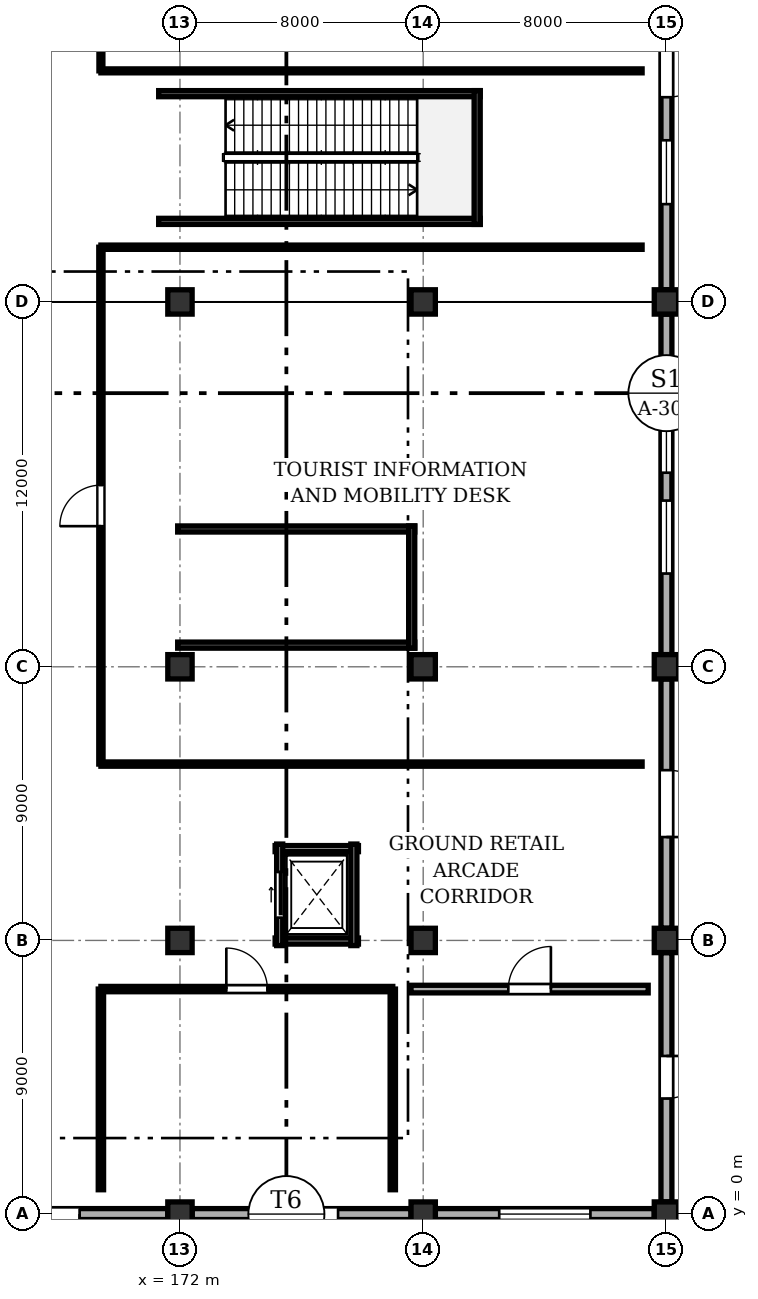
"""IFC4 building model, lengths in metres.
Left out: names, types, materials, properties, quantities, classifications, styles, units other than length and angle.
Written with IfcOpenShell. Run it as: python <this file> out.ifc"""

import sys

from ifc_helpers import new_model, si_unit, direction, frame, frame_2d, origin, origin_2d, place, context, subcontext, project, spatial, rectangle, extrude, element, fill, save


model = new_model("IFC4")
c1 = context("Model", 3, precision=1e-05, world=origin(), true_north=direction((0.0, 1.0)))
c2 = subcontext(c1, "Body", "Model", "MODEL_VIEW")
j1 = project(units=[si_unit("LENGTHUNIT", "METRE"), si_unit("PLANEANGLEUNIT", "RADIAN")], contexts=[c1])
p1 = place(None, origin())
s1 = spatial("IfcSite", under=j1, at=p1, CompositionType="ELEMENT")
p2 = place(p1, origin())
s2 = spatial("IfcBuilding", under=s1, at=p2, CompositionType="ELEMENT")
p3 = place(p2, origin())
s3 = spatial("IfcBuildingStorey", under=s2, at=p3, CompositionType="ELEMENT", Elevation=0.0)
for number, where, z_axis, x_axis in (
    (1, (172.0, 0.0, 0.0), (0.0, 0.0, 1.0), (1.0, 0.0, 0.0)),
    (2, (172.0, 9.0, 0.0), (0.0, 0.0, 1.0), (1.0, 0.0, 0.0)),
    (3, (172.0, 18.0, 0.0), (0.0, 0.0, 1.0), (1.0, 0.0, 0.0)),
    (4, (172.0, 30.0, 0.0), (0.0, 0.0, 1.0), (1.0, 0.0, 0.0)),
    (5, (180.0, 0.0, 0.0), (0.0, 0.0, 1.0), (1.0, 0.0, 0.0)),
    (6, (180.0, 9.0, 0.0), (0.0, 0.0, 1.0), (1.0, 0.0, 0.0)),
    (7, (180.0, 18.0, 0.0), (0.0, 0.0, 1.0), (1.0, 0.0, 0.0)),
    (8, (180.0, 30.0, 0.0), (0.0, 0.0, 1.0), (1.0, 0.0, 0.0)),
    (9, (188.0, 0.0, 0.0), (0.0, 0.0, 1.0), (1.0, 0.0, 0.0)),
    (10, (188.0, 9.0, 0.0), (0.0, 0.0, 1.0), (1.0, 0.0, 0.0)),
    (11, (188.0, 18.0, 0.0), (0.0, 0.0, 1.0), (1.0, 0.0, 0.0)),
    (12, (188.0, 30.0, 0.0), (0.0, 0.0, 1.0), (1.0, 0.0, 0.0)),
):
    element("IfcColumn", number, at=place(p3, frame(where, z_axis=z_axis, x_axis=x_axis)), inside=s3, PredefinedType="COLUMN", context=c2, shape_type="SweptSolid", body=[
        extrude(rectangle(XDim=0.8, YDim=0.8, at=origin_2d()), origin(), (0.0, 0.0, 1.0), 6.6),
    ])
p4 = place(p3, frame((171.6, 0.0, 0.0), z_axis=(0.0, 0.0, 1.0), x_axis=(-1.0, 0.0, 0.0)))
e13 = element("IfcWall", 13, at=p4, inside=s3, PredefinedType="SOLIDWALL", context=c2, shape_type="SweptSolid", body=[
    extrude(rectangle(XDim=8.2, YDim=0.36, at=frame_2d((4.1, 0.0))), origin(), (0.0, 0.0, 1.0), 5.875),
])
p5 = place(p4, frame((2.9, 0.0, 0.0)))
e14 = element("IfcOpeningElement", 14, at=p5, cuts=e13, PredefinedType="OPENING", context=c2, shape_type="SweptSolid", body=[
    extrude(rectangle(XDim=2.4, YDim=2.5, at=frame_2d((1.2, 1.25))), frame((0.0, 0.19, 0.0), z_axis=(0.0, -1.0, 0.0), x_axis=(1.0, 0.0, 0.0)), (0.0, 0.0, 1.0), 0.38),
])
p6 = place(p3, frame((179.6, 0.0, 0.0), z_axis=(0.0, 0.0, 1.0), x_axis=(-1.0, 0.0, 0.0)))
e15 = element("IfcWall", 15, at=p6, inside=s3, PredefinedType="SOLIDWALL", context=c2, shape_type="SweptSolid", body=[
    extrude(rectangle(XDim=7.2, YDim=0.36, at=frame_2d((3.6, 0.0))), origin(), (0.0, 0.0, 1.0), 5.875),
])
p7 = place(p6, frame((2.4, 0.0, 0.0)))
e16 = element("IfcOpeningElement", 16, at=p7, cuts=e15, PredefinedType="OPENING", context=c2, shape_type="SweptSolid", body=[
    extrude(rectangle(XDim=2.4, YDim=2.5, at=frame_2d((1.2, 1.25))), frame((0.0, 0.19, 0.0), z_axis=(0.0, -1.0, 0.0), x_axis=(1.0, 0.0, 0.0)), (0.0, 0.0, 1.0), 0.38),
])
p8 = place(p3, frame((187.6, 0.0, 0.0), z_axis=(0.0, 0.0, 1.0), x_axis=(-1.0, 0.0, 0.0)))
e17 = element("IfcWall", 17, at=p8, inside=s3, PredefinedType="SOLIDWALL", context=c2, shape_type="SweptSolid", body=[
    extrude(rectangle(XDim=7.2, YDim=0.36, at=frame_2d((3.6, 0.0))), origin(), (0.0, 0.0, 1.0), 5.875),
])
p9 = place(p8, frame((2.1, 0.0, 0.95)))
e18 = element("IfcOpeningElement", 18, at=p9, cuts=e17, PredefinedType="OPENING", context=c2, shape_type="SweptSolid", body=[
    extrude(rectangle(XDim=3.0, YDim=2.1, at=frame_2d((1.5, 1.05))), frame((0.0, 0.19, 0.0), z_axis=(0.0, -1.0, 0.0), x_axis=(1.0, 0.0, 0.0)), (0.0, 0.0, 1.0), 0.38),
])
p10 = place(p3, frame((188.0, 8.6, 0.0), z_axis=(0.0, 0.0, 1.0), x_axis=(0.0, -1.0, 0.0)))
e19 = element("IfcWall", 19, at=p10, inside=s3, PredefinedType="SOLIDWALL", context=c2, shape_type="SweptSolid", body=[
    extrude(rectangle(XDim=8.2, YDim=0.36, at=frame_2d((4.1, 0.0))), origin(), (0.0, 0.0, 1.0), 5.875),
])
p11 = place(p10, frame((3.4, 0.0, 0.0)))
e20 = element("IfcOpeningElement", 20, at=p11, cuts=e19, PredefinedType="OPENING", context=c2, shape_type="SweptSolid", body=[
    extrude(rectangle(XDim=1.4, YDim=2.1, at=frame_2d((0.7, 1.05))), frame((0.0, 0.19, 0.0), z_axis=(0.0, -1.0, 0.0), x_axis=(1.0, 0.0, 0.0)), (0.0, 0.0, 1.0), 0.38),
])
p12 = place(p3, frame((188.0, 17.6, 0.0), z_axis=(0.0, 0.0, 1.0), x_axis=(0.0, -1.0, 0.0)))
e21 = element("IfcWall", 21, at=p12, inside=s3, PredefinedType="SOLIDWALL", context=c2, shape_type="SweptSolid", body=[
    extrude(rectangle(XDim=8.2, YDim=0.36, at=frame_2d((4.1, 0.0))), origin(), (0.0, 0.0, 1.0), 5.755),
])
p13 = place(p12, frame((3.0, 0.0, 0.0)))
e22 = element("IfcOpeningElement", 22, at=p13, cuts=e21, PredefinedType="OPENING", context=c2, shape_type="SweptSolid", body=[
    extrude(rectangle(XDim=2.2, YDim=2.45, at=frame_2d((1.1, 1.225))), frame((0.0, 0.19, 0.0), z_axis=(0.0, -1.0, 0.0), x_axis=(1.0, 0.0, 0.0)), (0.0, 0.0, 1.0), 0.38),
])
p14 = place(p3, frame((188.0, 29.6, 0.0), z_axis=(0.0, 0.0, 1.0), x_axis=(0.0, -1.0, 0.0)))
e23 = element("IfcWall", 23, at=p14, inside=s3, PredefinedType="SOLIDWALL", context=c2, shape_type="SweptSolid", body=[
    extrude(rectangle(XDim=11.2, YDim=0.36, at=frame_2d((5.6, 0.0))), origin(), (0.0, 0.0, 1.0), 5.755),
])
p15 = place(p14, frame((2.517, 0.0, 0.95)))
e24 = element("IfcOpeningElement", 24, at=p15, cuts=e23, PredefinedType="OPENING", context=c2, shape_type="SweptSolid", body=[
    extrude(rectangle(XDim=2.7, YDim=2.1, at=frame_2d((1.35, 1.05))), frame((0.0, 0.19, 0.0), z_axis=(0.0, -1.0, 0.0), x_axis=(1.0, 0.0, 0.0)), (0.0, 0.0, 1.0), 0.38),
])
p16 = place(p14, frame((6.133, 0.0, 0.95)))
e25 = element("IfcOpeningElement", 25, at=p16, cuts=e23, PredefinedType="OPENING", context=c2, shape_type="SweptSolid", body=[
    extrude(rectangle(XDim=2.4, YDim=2.1, at=frame_2d((1.2, 1.05))), frame((0.0, 0.19, 0.0), z_axis=(0.0, -1.0, 0.0), x_axis=(1.0, 0.0, 0.0)), (0.0, 0.0, 1.0), 0.38),
])
p17 = place(p3, frame((188.0, 41.6, 0.0), z_axis=(0.0, 0.0, 1.0), x_axis=(0.0, -1.0, 0.0)))
e26 = element("IfcWall", 26, at=p17, inside=s3, PredefinedType="SOLIDWALL", context=c2, shape_type="SweptSolid", body=[
    extrude(rectangle(XDim=11.2, YDim=0.36, at=frame_2d((5.6, 0.0))), origin(), (0.0, 0.0, 1.0), 5.755),
])
p18 = place(p17, frame((2.867, 0.0, 0.0)))
e27 = element("IfcOpeningElement", 27, at=p18, cuts=e26, PredefinedType="OPENING", context=c2, shape_type="SweptSolid", body=[
    extrude(rectangle(XDim=2.0, YDim=2.4, at=frame_2d((1.0, 1.2))), frame((0.0, 0.19, 0.0), z_axis=(0.0, -1.0, 0.0), x_axis=(1.0, 0.0, 0.0)), (0.0, 0.0, 1.0), 0.38),
])
p19 = place(p17, frame((6.283, 0.0, 0.95)))
e28 = element("IfcOpeningElement", 28, at=p19, cuts=e26, PredefinedType="OPENING", context=c2, shape_type="SweptSolid", body=[
    extrude(rectangle(XDim=2.1, YDim=2.0, at=frame_2d((1.05, 1.0))), frame((0.0, 0.19, 0.0), z_axis=(0.0, -1.0, 0.0), x_axis=(1.0, 0.0, 0.0)), (0.0, 0.0, 1.0), 0.38),
])
for number, where, z_axis, x_axis in (
    (29, (171.3, 32.65, 0.0), (0.0, 0.0, 1.0), (1.0, 0.0, 0.0)),
    (30, (181.875, 36.85, 0.0), (0.0, 0.0, 1.0), (-1.0, 0.0, 0.0)),
):
    element("IfcWall", number, at=place(p3, frame(where, z_axis=z_axis, x_axis=x_axis)), inside=s3, PredefinedType="SOLIDWALL", context=c2, shape_type="SweptSolid", body=[
        extrude(rectangle(XDim=10.575, YDim=0.2, at=frame_2d((5.288, 0.0))), origin(), (0.0, 0.0, 1.0), 6.36),
    ])
p20 = place(p3, frame((181.775, 32.55, 0.0), z_axis=(0.0, 0.0, 1.0), x_axis=(0.0, 1.0, 0.0)))
e31 = element("IfcWall", 31, at=p20, inside=s3, PredefinedType="SOLIDWALL", context=c2, shape_type="SweptSolid", body=[
    extrude(rectangle(XDim=4.4, YDim=0.2, at=frame_2d((2.2, 0.0))), origin(), (0.0, 0.0, 1.0), 6.36),
])
for number, where, z_axis, x_axis in (
    (32, (171.925, 18.712, 0.0), (0.0, 0.0, 1.0), (1.0, 0.0, 0.0)),
    (33, (179.722, 22.532, 0.0), (0.0, 0.0, 1.0), (-1.0, 0.0, 0.0)),
):
    element("IfcWall", number, at=place(p3, frame(where, z_axis=z_axis, x_axis=x_axis)), inside=s3, PredefinedType="SOLIDWALL", context=c2, shape_type="SweptSolid", body=[
        extrude(rectangle(XDim=7.797, YDim=0.2, at=frame_2d((3.899, 0.0))), origin(), (0.0, 0.0, 1.0), 6.36),
    ])
p21 = place(p3, frame((179.623, 18.613, 0.0), z_axis=(0.0, 0.0, 1.0), x_axis=(0.0, 1.0, 0.0)))
e34 = element("IfcWall", 34, at=p21, inside=s3, PredefinedType="SOLIDWALL", context=c2, shape_type="SweptSolid", body=[
    extrude(rectangle(XDim=4.02, YDim=0.2, at=frame_2d((2.01, 0.0))), origin(), (0.0, 0.0, 1.0), 6.36),
])
for number, where, z_axis, x_axis in (
    (35, (175.13, 8.98, 0.0), (0.0, 0.0, 1.0), (1.0, 0.0, 0.0)),
    (36, (177.87, 12.02, 0.0), (0.0, 0.0, 1.0), (-1.0, 0.0, 0.0)),
):
    element("IfcWall", number, at=place(p3, frame(where, z_axis=z_axis, x_axis=x_axis)), inside=s3, PredefinedType="SOLIDWALL", context=c2, shape_type="SweptSolid", body=[
        extrude(rectangle(XDim=2.74, YDim=0.2, at=frame_2d((1.37, 0.0))), origin(), (0.0, 0.0, 1.0), 4.4),
    ])
p22 = place(p3, frame((175.28, 12.17, 0.0), z_axis=(0.0, 0.0, 1.0), x_axis=(0.0, -1.0, 0.0)))
e37 = element("IfcWall", 37, at=p22, inside=s3, PredefinedType="SOLIDWALL", context=c2, shape_type="SweptSolid", body=[
    extrude(rectangle(XDim=3.34, YDim=0.2, at=frame_2d((1.67, 0.0))), origin(), (0.0, 0.0, 1.0), 4.4),
])
p23 = place(p22, frame((0.92, 0.0, 0.0)))
e38 = element("IfcOpeningElement", 38, at=p23, cuts=e37, PredefinedType="OPENING", context=c2, shape_type="SweptSolid", body=[
    extrude(rectangle(XDim=1.5, YDim=2.2, at=frame_2d((0.75, 1.1))), frame((0.0, 0.11, 0.0), z_axis=(0.0, -1.0, 0.0), x_axis=(1.0, 0.0, 0.0)), (0.0, 0.0, 1.0), 0.22),
])
p24 = place(p3, frame((177.72, 8.83, 0.0), z_axis=(0.0, 0.0, 1.0), x_axis=(0.0, 1.0, 0.0)))
e39 = element("IfcWall", 39, at=p24, inside=s3, PredefinedType="SOLIDWALL", context=c2, shape_type="SweptSolid", body=[
    extrude(rectangle(XDim=3.34, YDim=0.2, at=frame_2d((1.67, 0.0))), origin(), (0.0, 0.0, 1.0), 4.4),
])
p25 = place(p3, frame((169.4, 7.4, 0.0), z_axis=(0.0, 0.0, 1.0), x_axis=(1.0, 0.0, 0.0)))
e40 = element("IfcWall", 40, at=p25, inside=s3, PredefinedType="PARTITIONING", context=c2, shape_type="SweptSolid", body=[
    extrude(rectangle(XDim=9.6, YDim=0.175, at=frame_2d((4.8, 0.0))), origin(), (0.0, 0.0, 1.0), 4.4),
])
p26 = place(p25, frame((4.125, 0.0, 0.0)))
e41 = element("IfcOpeningElement", 41, at=p26, cuts=e40, PredefinedType="OPENING", context=c2, shape_type="SweptSolid", body=[
    extrude(rectangle(XDim=1.35, YDim=2.1, at=frame_2d((0.675, 1.05))), frame((0.0, 0.097, 0.0), z_axis=(0.0, -1.0, 0.0), x_axis=(1.0, 0.0, 0.0)), (0.0, 0.0, 1.0), 0.195),
])
for number, where, z_axis, x_axis in (
    (42, (169.4, 0.8, 0.0), (0.0, 0.0, 1.0), (0.0, 1.0, 0.0)),
    (43, (179.0, 7.4, 0.0), (0.0, 0.0, 1.0), (0.0, -1.0, 0.0)),
):
    element("IfcWall", number, at=place(p3, frame(where, z_axis=z_axis, x_axis=x_axis)), inside=s3, PredefinedType="PARTITIONING", context=c2, shape_type="SweptSolid", body=[
        extrude(rectangle(XDim=6.6, YDim=0.175, at=frame_2d((3.3, 0.0))), origin(), (0.0, 0.0, 1.0), 4.4),
    ])
p27 = place(p3, frame((179.6, 7.4, 0.0), z_axis=(0.0, 0.0, 1.0), x_axis=(1.0, 0.0, 0.0)))
e44 = element("IfcWall", 44, at=p27, inside=s3, PredefinedType="SOLIDWALL", context=c2, shape_type="SweptSolid", body=[
    extrude(rectangle(XDim=7.8, YDim=0.25, at=frame_2d((3.9, 0.0))), origin(), (0.0, 0.0, 1.0), 4.4),
])
p28 = place(p27, frame((3.2, 0.0, 0.0)))
e45 = element("IfcOpeningElement", 45, at=p28, cuts=e44, PredefinedType="OPENING", context=c2, shape_type="SweptSolid", body=[
    extrude(rectangle(XDim=1.4, YDim=2.1, at=frame_2d((0.7, 1.05))), frame((0.0, 0.135, 0.0), z_axis=(0.0, -1.0, 0.0), x_axis=(1.0, 0.0, 0.0)), (0.0, 0.0, 1.0), 0.27),
])
for number, where, z_axis, x_axis in (
    (46, (187.2, 14.8, 0.0), (0.0, 0.0, 1.0), (-1.0, 0.0, 0.0)),
    (47, (169.4, 31.8, 0.0), (0.0, 0.0, 1.0), (1.0, 0.0, 0.0)),
):
    element("IfcWall", number, at=place(p3, frame(where, z_axis=z_axis, x_axis=x_axis)), inside=s3, PredefinedType="PARTITIONING", context=c2, shape_type="SweptSolid", body=[
        extrude(rectangle(XDim=17.8, YDim=0.14, at=frame_2d((8.9, 0.0))), origin(), (0.0, 0.0, 1.0), 4.4),
    ])
p29 = place(p3, frame((169.4, 14.8, 0.0), z_axis=(0.0, 0.0, 1.0), x_axis=(0.0, 1.0, 0.0)))
e48 = element("IfcWall", 48, at=p29, inside=s3, PredefinedType="PARTITIONING", context=c2, shape_type="SweptSolid", body=[
    extrude(rectangle(XDim=17.0, YDim=0.14, at=frame_2d((8.5, 0.0))), origin(), (0.0, 0.0, 1.0), 4.4),
])
p30 = place(p29, frame((7.825, 0.0, 0.0)))
e49 = element("IfcOpeningElement", 49, at=p30, cuts=e48, PredefinedType="OPENING", context=c2, shape_type="SweptSolid", body=[
    extrude(rectangle(XDim=1.35, YDim=2.1, at=frame_2d((0.675, 1.05))), frame((0.0, 0.08, 0.0), z_axis=(0.0, -1.0, 0.0), x_axis=(1.0, 0.0, 0.0)), (0.0, 0.0, 1.0), 0.16),
])
p31 = place(p3, frame((187.2, 37.6, 0.0), z_axis=(0.0, 0.0, 1.0), x_axis=(-1.0, 0.0, 0.0)))
e50 = element("IfcWall", 50, at=p31, inside=s3, PredefinedType="PARTITIONING", context=c2, shape_type="SweptSolid", body=[
    extrude(rectangle(XDim=17.8, YDim=0.13, at=frame_2d((8.9, 0.0))), origin(), (0.0, 0.0, 1.0), 4.4),
])
p32 = place(p3, frame((169.4, 37.6, 0.0), z_axis=(0.0, 0.0, 1.0), x_axis=(0.0, 1.0, 0.0)))
e51 = element("IfcWall", 51, at=p32, inside=s3, PredefinedType="PARTITIONING", context=c2, shape_type="SweptSolid", body=[
    extrude(rectangle(XDim=15.8, YDim=0.13, at=frame_2d((7.9, 0.0))), origin(), (0.0, 0.0, 1.0), 4.4),
])
p33 = place(p32, frame((7.125, 0.0, 0.0)))
e52 = element("IfcOpeningElement", 52, at=p33, cuts=e51, PredefinedType="OPENING", context=c2, shape_type="SweptSolid", body=[
    extrude(rectangle(XDim=1.55, YDim=2.1, at=frame_2d((0.775, 1.05))), frame((0.0, 0.075, 0.0), z_axis=(0.0, -1.0, 0.0), x_axis=(1.0, 0.0, 0.0)), (0.0, 0.0, 1.0), 0.15),
])
p34 = place(p32, frame((12.008, 0.0, 0.0)))
e53 = element("IfcOpeningElement", 53, at=p34, cuts=e51, PredefinedType="OPENING", context=c2, shape_type="SweptSolid", body=[
    extrude(rectangle(XDim=1.55, YDim=2.1, at=frame_2d((0.775, 1.05))), frame((0.0, 0.075, 0.0), z_axis=(0.0, -1.0, 0.0), x_axis=(1.0, 0.0, 0.0)), (0.0, 0.0, 1.0), 0.15),
])
p35 = place(p5, origin())
e54 = element("IfcDoor", 54, at=p35, inside=s3, OperationType="SINGLE_SWING_LEFT", PredefinedType="DOOR", context=c2, shape_type="SweptSolid", body=[
    extrude(rectangle(XDim=2.4, YDim=2.5, at=frame_2d((1.2, 1.25))), frame((0.0, 0.025, 0.0), z_axis=(0.0, -1.0, 0.0), x_axis=(1.0, 0.0, 0.0)), (0.0, 0.0, 1.0), 0.05),
])
fill(e14, e54)
p36 = place(p7, origin())
e55 = element("IfcDoor", 55, at=p36, inside=s3, OperationType="SINGLE_SWING_RIGHT", PredefinedType="DOOR", context=c2, shape_type="SweptSolid", body=[
    extrude(rectangle(XDim=2.4, YDim=2.5, at=frame_2d((1.2, 1.25))), frame((0.0, 0.025, 0.0), z_axis=(0.0, -1.0, 0.0), x_axis=(1.0, 0.0, 0.0)), (0.0, 0.0, 1.0), 0.05),
])
fill(e16, e55)
p37 = place(p9, origin())
e56 = element("IfcWindow", 56, at=p37, inside=s3, PartitioningType="SINGLE_PANEL", PredefinedType="WINDOW", context=c2, shape_type="SweptSolid", body=[
    extrude(rectangle(XDim=3.0, YDim=2.1, at=frame_2d((1.5, 1.05))), frame((0.0, 0.03, 0.0), z_axis=(0.0, -1.0, 0.0), x_axis=(1.0, 0.0, 0.0)), (0.0, 0.0, 1.0), 0.06),
])
fill(e18, e56)
p38 = place(p11, origin())
e57 = element("IfcDoor", 57, at=p38, inside=s3, OperationType="SINGLE_SWING_LEFT", PredefinedType="DOOR", context=c2, shape_type="SweptSolid", body=[
    extrude(rectangle(XDim=1.4, YDim=2.1, at=frame_2d((0.7, 1.05))), frame((0.0, 0.025, 0.0), z_axis=(0.0, -1.0, 0.0), x_axis=(1.0, 0.0, 0.0)), (0.0, 0.0, 1.0), 0.05),
])
fill(e20, e57)
p39 = place(p13, origin())
e58 = element("IfcDoor", 58, at=p39, inside=s3, OperationType="SINGLE_SWING_RIGHT", PredefinedType="DOOR", context=c2, shape_type="SweptSolid", body=[
    extrude(rectangle(XDim=2.2, YDim=2.45, at=frame_2d((1.1, 1.225))), frame((0.0, 0.025, 0.0), z_axis=(0.0, -1.0, 0.0), x_axis=(1.0, 0.0, 0.0)), (0.0, 0.0, 1.0), 0.05),
])
fill(e22, e58)
p40 = place(p15, origin())
e59 = element("IfcWindow", 59, at=p40, inside=s3, PartitioningType="SINGLE_PANEL", PredefinedType="WINDOW", context=c2, shape_type="SweptSolid", body=[
    extrude(rectangle(XDim=2.7, YDim=2.1, at=frame_2d((1.35, 1.05))), frame((0.0, 0.03, 0.0), z_axis=(0.0, -1.0, 0.0), x_axis=(1.0, 0.0, 0.0)), (0.0, 0.0, 1.0), 0.06),
])
fill(e24, e59)
p41 = place(p16, origin())
e60 = element("IfcWindow", 60, at=p41, inside=s3, PartitioningType="SINGLE_PANEL", PredefinedType="WINDOW", context=c2, shape_type="SweptSolid", body=[
    extrude(rectangle(XDim=2.4, YDim=2.1, at=frame_2d((1.2, 1.05))), frame((0.0, 0.03, 0.0), z_axis=(0.0, -1.0, 0.0), x_axis=(1.0, 0.0, 0.0)), (0.0, 0.0, 1.0), 0.06),
])
fill(e25, e60)
p42 = place(p18, origin())
e61 = element("IfcDoor", 61, at=p42, inside=s3, OperationType="SINGLE_SWING_LEFT", PredefinedType="DOOR", context=c2, shape_type="SweptSolid", body=[
    extrude(rectangle(XDim=2.0, YDim=2.4, at=frame_2d((1.0, 1.2))), frame((0.0, 0.025, 0.0), z_axis=(0.0, -1.0, 0.0), x_axis=(1.0, 0.0, 0.0)), (0.0, 0.0, 1.0), 0.05),
])
fill(e27, e61)
p43 = place(p19, origin())
e62 = element("IfcWindow", 62, at=p43, inside=s3, PartitioningType="SINGLE_PANEL", PredefinedType="WINDOW", context=c2, shape_type="SweptSolid", body=[
    extrude(rectangle(XDim=2.1, YDim=2.0, at=frame_2d((1.05, 1.0))), frame((0.0, 0.03, 0.0), z_axis=(0.0, -1.0, 0.0), x_axis=(1.0, 0.0, 0.0)), (0.0, 0.0, 1.0), 0.06),
])
fill(e28, e62)
p44 = place(p23, origin())
e63 = element("IfcDoor", 63, at=p44, inside=s3, OperationType="SLIDING_TO_LEFT", PredefinedType="DOOR", context=c2, shape_type="SweptSolid", body=[
    extrude(rectangle(XDim=1.5, YDim=2.2, at=frame_2d((0.75, 1.1))), frame((0.0, 0.025, 0.0), z_axis=(0.0, -1.0, 0.0), x_axis=(1.0, 0.0, 0.0)), (0.0, 0.0, 1.0), 0.05),
])
fill(e38, e63)
p45 = place(p26, origin())
e64 = element("IfcDoor", 64, at=p45, inside=s3, OperationType="SINGLE_SWING_LEFT", PredefinedType="DOOR", context=c2, shape_type="SweptSolid", body=[
    extrude(rectangle(XDim=1.35, YDim=2.1, at=frame_2d((0.675, 1.05))), frame((0.0, 0.025, 0.0), z_axis=(0.0, -1.0, 0.0), x_axis=(1.0, 0.0, 0.0)), (0.0, 0.0, 1.0), 0.05),
])
fill(e41, e64)
p46 = place(p28, origin())
e65 = element("IfcDoor", 65, at=p46, inside=s3, OperationType="SINGLE_SWING_RIGHT", PredefinedType="DOOR", context=c2, shape_type="SweptSolid", body=[
    extrude(rectangle(XDim=1.4, YDim=2.1, at=frame_2d((0.7, 1.05))), frame((0.0, 0.025, 0.0), z_axis=(0.0, -1.0, 0.0), x_axis=(1.0, 0.0, 0.0)), (0.0, 0.0, 1.0), 0.05),
])
fill(e45, e65)
p47 = place(p30, origin())
e66 = element("IfcDoor", 66, at=p47, inside=s3, OperationType="SINGLE_SWING_LEFT", PredefinedType="DOOR", context=c2, shape_type="SweptSolid", body=[
    extrude(rectangle(XDim=1.35, YDim=2.1, at=frame_2d((0.675, 1.05))), frame((0.0, 0.025, 0.0), z_axis=(0.0, -1.0, 0.0), x_axis=(1.0, 0.0, 0.0)), (0.0, 0.0, 1.0), 0.05),
])
fill(e49, e66)
save(model, sys.argv[1])
